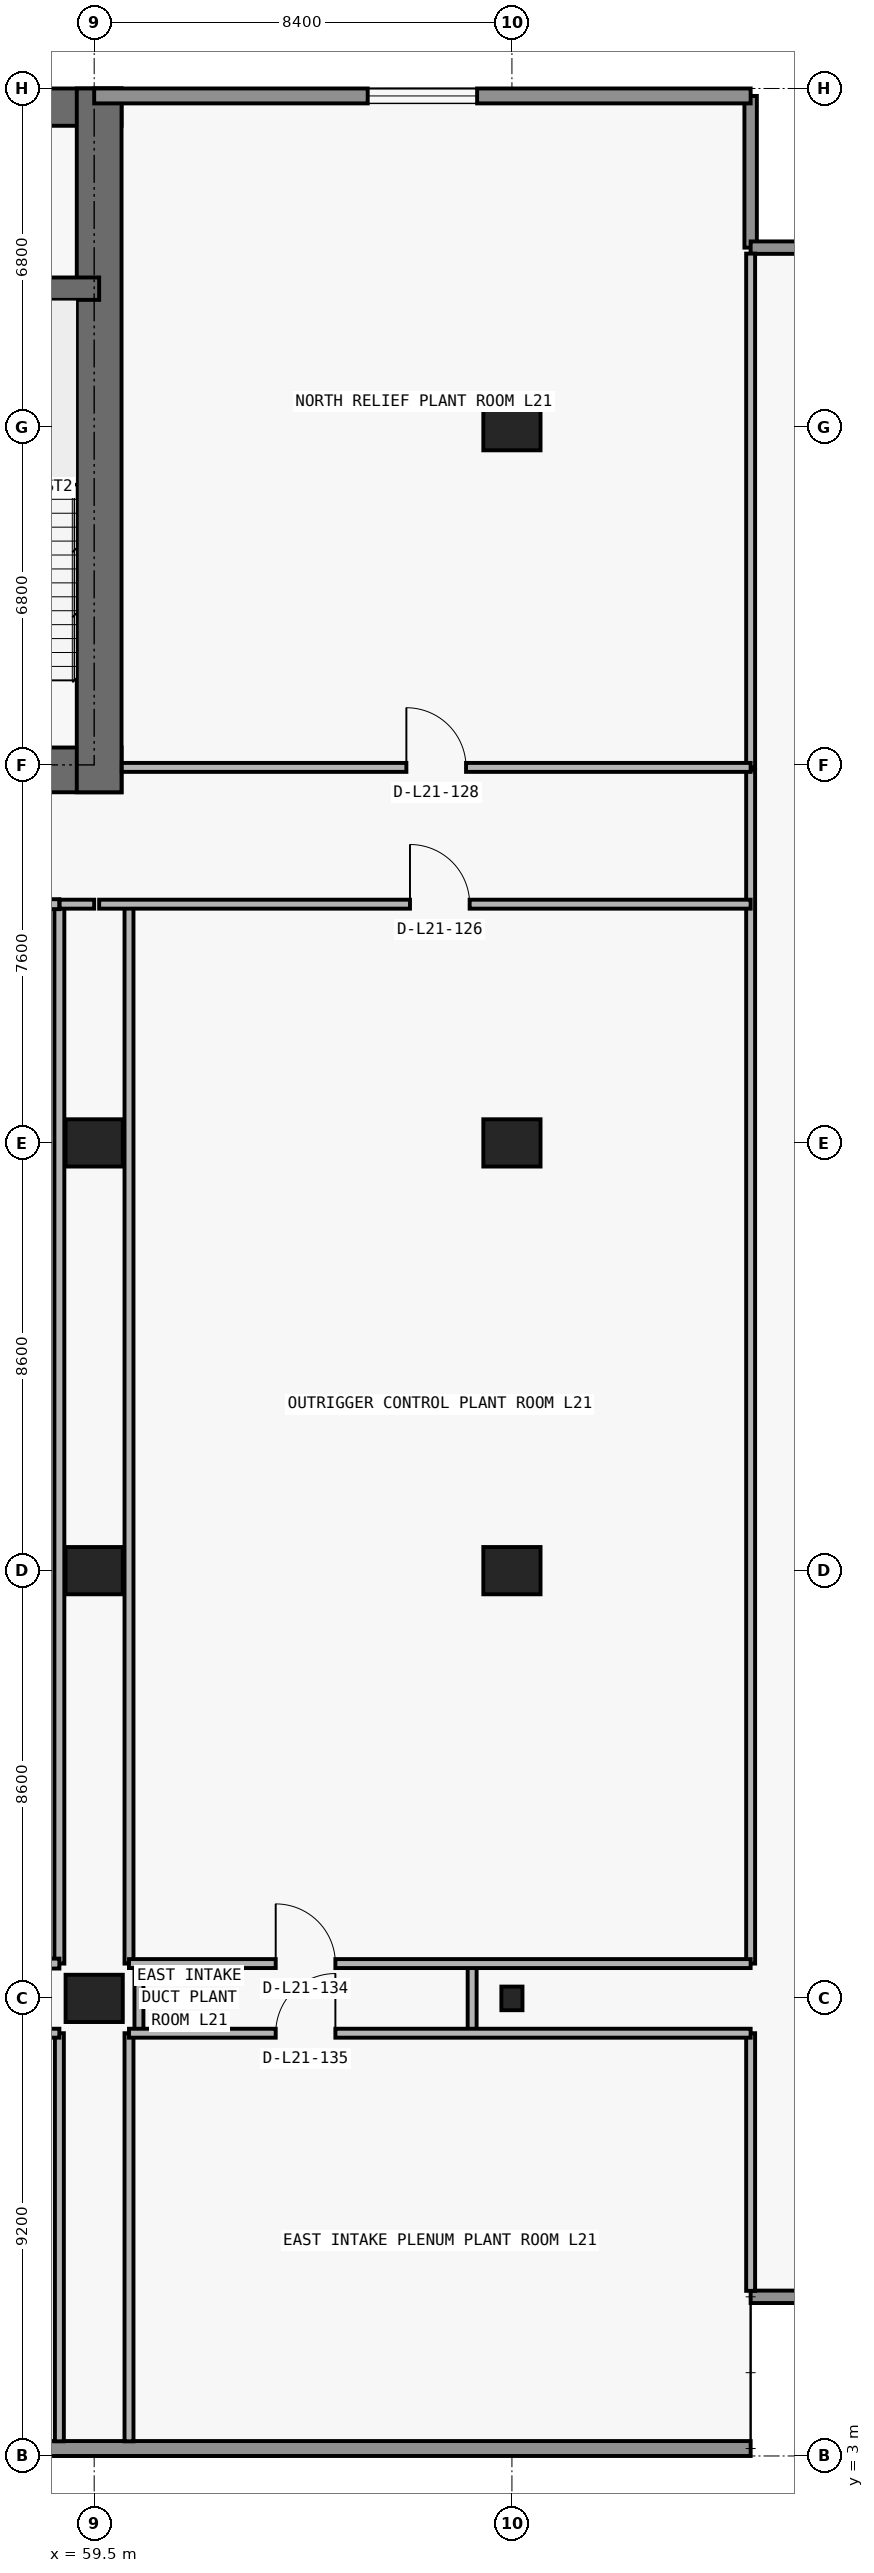
"""IFC4 building model, lengths in metres.
Left out: names, types, materials, properties, quantities, classifications, styles, units other than length and angle.
Written with IfcOpenShell. Run it as: python <this file> out.ifc"""

import sys

from ifc_helpers import new_model, si_unit, direction, frame, frame_2d, origin, origin_2d, place, context, subcontext, project, spatial, rectangle, i_section, extrude, element, fill, save


model = new_model("IFC4")
c1 = context("Model", 3, precision=1e-05, world=origin(), true_north=direction((0.0, 1.0)))
c2 = subcontext(c1, "Body", "Model", "MODEL_VIEW")
j1 = project(units=[si_unit("LENGTHUNIT", "METRE"), si_unit("PLANEANGLEUNIT", "RADIAN")], contexts=[c1])
p1 = place(None, origin())
s1 = spatial("IfcSite", under=j1, at=p1, CompositionType="ELEMENT")
p2 = place(p1, origin())
s2 = spatial("IfcBuilding", under=s1, at=p2, CompositionType="ELEMENT")
p3 = place(p2, frame((0.0, 0.0, 79.5)))
s3 = spatial("IfcBuildingStorey", under=s2, at=p3, CompositionType="ELEMENT", Elevation=79.5)
p4 = place(p3, frame((59.5, 12.2, 0.0), z_axis=(0.0, 0.0, 1.0), x_axis=(1.0, 0.0, 0.0)))
e1 = element("IfcColumn", 1, at=p4, inside=s3, PredefinedType="COLUMN", context=c2, shape_type="SweptSolid", body=[
    extrude(rectangle(XDim=1.15, YDim=0.95, at=origin_2d()), origin(), (0.0, 0.0, 1.0), 4.85),
])
p5 = place(p3, frame((67.9, 12.2, 0.0), z_axis=(0.0, 0.0, 1.0), x_axis=(1.0, 0.0, 0.0)))
e2 = element("IfcColumn", 2, at=p5, inside=s3, PredefinedType="COLUMN", context=c2, shape_type="SweptSolid", body=[
    extrude(i_section(OverallWidth=0.424, OverallDepth=0.475, WebThickness=0.048, FlangeThickness=0.077, FilletRadius=0.015, at=origin_2d()), origin(), (0.0, 0.0, 1.0), 4.85),
])
for number, where, z_axis, x_axis in (
    (3, (59.5, 20.8, 0.0), (0.0, 0.0, 1.0), (1.0, 0.0, 0.0)),
    (4, (67.9, 20.8, 0.0), (0.0, 0.0, 1.0), (1.0, 0.0, 0.0)),
    (5, (59.5, 29.4, 0.0), (0.0, 0.0, 1.0), (1.0, 0.0, 0.0)),
    (6, (67.9, 29.4, 0.0), (0.0, 0.0, 1.0), (1.0, 0.0, 0.0)),
    (7, (67.9, 43.8, 0.0), (0.0, 0.0, 1.0), (1.0, 0.0, 0.0)),
):
    element("IfcColumn", number, at=place(p3, frame(where, z_axis=z_axis, x_axis=x_axis)), inside=s3, PredefinedType="COLUMN", context=c2, shape_type="SweptSolid", body=[
        extrude(rectangle(XDim=1.15, YDim=0.95, at=origin_2d()), origin(), (0.0, 0.0, 1.0), 4.85),
    ])
p6 = place(p3, frame((17.75, 36.9, 0.0), z_axis=(0.0, 0.0, 1.0), x_axis=(1.0, 0.0, 0.0)))
e8 = element("IfcWall", 8, at=p6, inside=s3, PredefinedType="SHEAR", context=c2, shape_type="SweptSolid", body=[
    extrude(rectangle(XDim=42.3, YDim=0.9, at=frame_2d((21.15, 0.0))), origin(), (0.0, 0.0, 1.0), 4.85),
])
p7 = place(p6, frame((14.55, 0.0, 0.0)))
e9 = element("IfcOpeningElement", 9, at=p7, cuts=e8, PredefinedType="OPENING", context=c2, shape_type="SweptSolid", body=[
    extrude(rectangle(XDim=1.1, YDim=2.15, at=frame_2d((0.55, 1.075))), frame((0.0, 0.46, 0.0), z_axis=(0.0, -1.0, 0.0), x_axis=(1.0, 0.0, 0.0)), (0.0, 0.0, 1.0), 0.92),
])
p8 = place(p6, frame((6.4, 0.0, 0.0)))
e10 = element("IfcOpeningElement", 10, at=p8, cuts=e8, PredefinedType="OPENING", context=c2, shape_type="SweptSolid", body=[
    extrude(rectangle(XDim=1.05, YDim=2.15, at=frame_2d((0.525, 1.075))), frame((0.0, 0.46, 0.0), z_axis=(0.0, -1.0, 0.0), x_axis=(1.0, 0.0, 0.0)), (0.0, 0.0, 1.0), 0.92),
])
p9 = place(p6, frame((34.9, 0.0, 0.0)))
e11 = element("IfcOpeningElement", 11, at=p9, cuts=e8, PredefinedType="OPENING", context=c2, shape_type="SweptSolid", body=[
    extrude(rectangle(XDim=1.05, YDim=2.15, at=frame_2d((0.525, 1.075))), frame((0.0, 0.46, 0.0), z_axis=(0.0, -1.0, 0.0), x_axis=(1.0, 0.0, 0.0)), (0.0, 0.0, 1.0), 0.92),
])
p10 = place(p6, frame((11.012, 0.0, 0.0)))
e12 = element("IfcOpeningElement", 12, at=p10, cuts=e8, PredefinedType="OPENING", context=c2, shape_type="SweptSolid", body=[
    extrude(rectangle(XDim=1.05, YDim=2.15, at=frame_2d((0.525, 1.075))), frame((0.0, 0.46, 0.0), z_axis=(0.0, -1.0, 0.0), x_axis=(1.0, 0.0, 0.0)), (0.0, 0.0, 1.0), 0.92),
])
p11 = place(p6, frame((24.25, 0.0, 0.0)))
e13 = element("IfcOpeningElement", 13, at=p11, cuts=e8, PredefinedType="OPENING", context=c2, shape_type="SweptSolid", body=[
    extrude(rectangle(XDim=1.05, YDim=2.15, at=frame_2d((0.525, 1.075))), frame((0.0, 0.46, 0.0), z_axis=(0.0, -1.0, 0.0), x_axis=(1.0, 0.0, 0.0)), (0.0, 0.0, 1.0), 0.92),
])
p12 = place(p3, frame((17.75, 50.225, 0.0), z_axis=(0.0, 0.0, 1.0), x_axis=(1.0, 0.0, 0.0)))
e14 = element("IfcWall", 14, at=p12, inside=s3, PredefinedType="SHEAR", context=c2, shape_type="SweptSolid", body=[
    extrude(rectangle(XDim=42.3, YDim=0.75, at=frame_2d((21.15, 0.0))), origin(), (0.0, 0.0, 1.0), 4.85),
])
p13 = place(p3, frame((59.6, 36.45, 0.0), z_axis=(0.0, 0.0, 1.0), x_axis=(0.0, 1.0, 0.0)))
e15 = element("IfcWall", 15, at=p13, inside=s3, PredefinedType="SHEAR", context=c2, shape_type="SweptSolid", body=[
    extrude(rectangle(XDim=14.15, YDim=0.9, at=frame_2d((7.075, 0.0))), origin(), (0.0, 0.0, 1.0), 4.85),
])
p14 = place(p3, frame((18.2, 46.575, 0.0), z_axis=(0.0, 0.0, 1.0), x_axis=(1.0, 0.0, 0.0)))
e16 = element("IfcWall", 16, at=p14, inside=s3, PredefinedType="SHEAR", context=c2, shape_type="SweptSolid", body=[
    extrude(rectangle(XDim=41.4, YDim=0.45, at=frame_2d((20.7, 0.0))), origin(), (0.0, 0.0, 1.0), 4.85),
])
p15 = place(p14, frame((7.7, 0.0, 0.0)))
e17 = element("IfcOpeningElement", 17, at=p15, cuts=e16, PredefinedType="OPENING", context=c2, shape_type="SweptSolid", body=[
    extrude(rectangle(XDim=1.0, YDim=2.2, at=frame_2d((0.5, 1.1))), frame((0.0, 0.235, 0.0), z_axis=(0.0, -1.0, 0.0), x_axis=(1.0, 0.0, 0.0)), (0.0, 0.0, 1.0), 0.47),
])
p16 = place(p14, frame((32.725, 0.0, 0.0)))
e18 = element("IfcOpeningElement", 18, at=p16, cuts=e16, PredefinedType="OPENING", context=c2, shape_type="SweptSolid", body=[
    extrude(rectangle(XDim=1.05, YDim=2.15, at=frame_2d((0.525, 1.075))), frame((0.0, 0.235, 0.0), z_axis=(0.0, -1.0, 0.0), x_axis=(1.0, 0.0, 0.0)), (0.0, 0.0, 1.0), 0.47),
])
p17 = place(p3, frame((72.7, 3.15, 0.0), z_axis=(0.0, 0.0, 1.0), x_axis=(-1.0, 0.0, 0.0)))
e19 = element("IfcWall", 19, at=p17, inside=s3, PredefinedType="STANDARD", context=c2, shape_type="SweptSolid", body=[
    extrude(rectangle(XDim=67.6, YDim=0.3, at=frame_2d((33.8, 0.0))), origin(), (0.0, 0.0, 1.0), 4.85),
])
p18 = place(p3, frame((72.7, 6.2, 0.0), z_axis=(0.0, 0.0, 1.0), x_axis=(1.0, 0.0, 0.0)))
e20 = element("IfcWall", 20, at=p18, inside=s3, PredefinedType="ELEMENTEDWALL", context=c2, shape_type="SweptSolid", body=[
    extrude(rectangle(XDim=3.45, YDim=0.25, at=frame_2d((1.725, 0.0))), origin(), (0.0, 0.0, 1.0), 4.85),
])
p19 = place(p3, frame((72.7, 50.45, 0.0), z_axis=(0.0, 0.0, 1.0), x_axis=(0.0, -1.0, 0.0)))
e21 = element("IfcWall", 21, at=p19, inside=s3, PredefinedType="ELEMENTEDWALL", context=c2, shape_type="SweptSolid", body=[
    extrude(rectangle(XDim=3.05, YDim=0.25, at=frame_2d((1.525, 0.0))), origin(), (0.0, 0.0, 1.0), 4.85),
])
p20 = place(p3, frame((72.7, 47.4, 0.0), z_axis=(0.0, 0.0, 1.0), x_axis=(1.0, 0.0, 0.0)))
e22 = element("IfcWall", 22, at=p20, inside=s3, PredefinedType="ELEMENTEDWALL", context=c2, shape_type="SweptSolid", body=[
    extrude(rectangle(XDim=3.45, YDim=0.25, at=frame_2d((1.725, 0.0))), origin(), (0.0, 0.0, 1.0), 4.85),
])
p21 = place(p3, frame((59.5, 50.45, 0.0), z_axis=(0.0, 0.0, 1.0), x_axis=(1.0, 0.0, 0.0)))
e23 = element("IfcWall", 23, at=p21, inside=s3, PredefinedType="STANDARD", context=c2, shape_type="SweptSolid", body=[
    extrude(rectangle(XDim=13.2, YDim=0.3, at=frame_2d((6.6, 0.0))), origin(), (0.0, 0.0, 1.0), 4.85),
])
p22 = place(p21, frame((5.5, 0.0, 0.85)))
e24 = element("IfcOpeningElement", 24, at=p22, cuts=e23, PredefinedType="OPENING", context=c2, shape_type="SweptSolid", body=[
    extrude(rectangle(XDim=2.2, YDim=1.55, at=frame_2d((1.1, 0.775))), frame((0.0, 0.16, 0.0), z_axis=(0.0, -1.0, 0.0), x_axis=(1.0, 0.0, 0.0)), (0.0, 0.0, 1.0), 0.32),
])
p23 = place(p3, frame((58.8, 3.295, 0.0), z_axis=(0.0, 0.0, 1.0), x_axis=(0.0, 1.0, 0.0)))
e25 = element("IfcWall", 25, at=p23, inside=s3, PredefinedType="PARTITIONING", context=c2, shape_type="SweptSolid", body=[
    extrude(rectangle(XDim=8.205, YDim=0.18, at=frame_2d((4.103, 0.0))), origin(), (0.0, 0.0, 1.0), 4.85),
])
p24 = place(p3, frame((58.8, 12.9, 0.0), z_axis=(0.0, 0.0, 1.0), x_axis=(0.0, 1.0, 0.0)))
e26 = element("IfcWall", 26, at=p24, inside=s3, PredefinedType="PARTITIONING", context=c2, shape_type="SweptSolid", body=[
    extrude(rectangle(XDim=21.3, YDim=0.2, at=frame_2d((10.65, 0.0))), origin(), (0.0, 0.0, 1.0), 4.85),
])
p25 = place(p3, frame((60.2, 3.295, 0.0), z_axis=(0.0, 0.0, 1.0), x_axis=(0.0, 1.0, 0.0)))
e27 = element("IfcWall", 27, at=p25, inside=s3, PredefinedType="PARTITIONING", context=c2, shape_type="SweptSolid", body=[
    extrude(rectangle(XDim=8.205, YDim=0.18, at=frame_2d((4.103, 0.0))), origin(), (0.0, 0.0, 1.0), 4.85),
])
p26 = place(p3, frame((60.2, 12.9, 0.0), z_axis=(0.0, 0.0, 1.0), x_axis=(0.0, 1.0, 0.0)))
e28 = element("IfcWall", 28, at=p26, inside=s3, PredefinedType="PARTITIONING", context=c2, shape_type="SweptSolid", body=[
    extrude(rectangle(XDim=21.3, YDim=0.18, at=frame_2d((10.65, 0.0))), origin(), (0.0, 0.0, 1.0), 4.85),
])
p27 = place(p3, frame((60.4, 11.505, 0.0), z_axis=(0.0, 0.0, 1.0), x_axis=(0.0, 1.0, 0.0)))
e29 = element("IfcWall", 29, at=p27, inside=s3, PredefinedType="PARTITIONING", context=c2, shape_type="SweptSolid", body=[
    extrude(rectangle(XDim=1.39, YDim=0.18, at=frame_2d((0.695, 0.0))), origin(), (0.0, 0.0, 1.0), 4.85),
])
p28 = place(p3, frame((67.1, 11.5, 0.0), z_axis=(0.0, 0.0, 1.0), x_axis=(0.0, 1.0, 0.0)))
e30 = element("IfcWall", 30, at=p28, inside=s3, PredefinedType="PARTITIONING", context=c2, shape_type="SweptSolid", body=[
    extrude(rectangle(XDim=1.4, YDim=0.18, at=frame_2d((0.7, 0.0))), origin(), (0.0, 0.0, 1.0), 4.85),
])
p29 = place(p3, frame((72.7, 6.32, 0.0), z_axis=(0.0, 0.0, 1.0), x_axis=(0.0, 1.0, 0.0)))
e31 = element("IfcWall", 31, at=p29, inside=s3, PredefinedType="PARTITIONING", context=c2, shape_type="SweptSolid", body=[
    extrude(rectangle(XDim=5.18, YDim=0.18, at=frame_2d((2.59, 0.0))), origin(), (0.0, 0.0, 1.0), 4.85),
])
p30 = place(p3, frame((72.7, 12.9, 0.0), z_axis=(0.0, 0.0, 1.0), x_axis=(0.0, 1.0, 0.0)))
e32 = element("IfcWall", 32, at=p30, inside=s3, PredefinedType="PARTITIONING", context=c2, shape_type="SweptSolid", body=[
    extrude(rectangle(XDim=24.0, YDim=0.18, at=frame_2d((12.0, 0.0))), origin(), (0.0, 0.0, 1.0), 4.85),
])
p31 = place(p3, frame((72.7, 36.95, 0.0), z_axis=(0.0, 0.0, 1.0), x_axis=(0.0, 1.0, 0.0)))
e33 = element("IfcWall", 33, at=p31, inside=s3, PredefinedType="PARTITIONING", context=c2, shape_type="SweptSolid", body=[
    extrude(rectangle(XDim=10.33, YDim=0.18, at=frame_2d((5.165, 0.0))), origin(), (0.0, 0.0, 1.0), 4.85),
])
p32 = place(p3, frame((19.0, 11.5, 0.0), z_axis=(0.0, 0.0, 1.0), x_axis=(1.0, 0.0, 0.0)))
e34 = element("IfcWall", 34, at=p32, inside=s3, PredefinedType="PARTITIONING", context=c2, shape_type="SweptSolid", body=[
    extrude(rectangle(XDim=39.8, YDim=0.18, at=frame_2d((19.9, 0.0))), origin(), (0.0, 0.0, 1.0), 4.85),
])
p33 = place(p32, frame((19.3, 0.0, 0.0)))
e35 = element("IfcOpeningElement", 35, at=p33, cuts=e34, PredefinedType="OPENING", context=c2, shape_type="SweptSolid", body=[
    extrude(rectangle(XDim=1.2, YDim=2.2, at=frame_2d((0.6, 1.1))), frame((0.0, 0.1, 0.0), z_axis=(0.0, -1.0, 0.0), x_axis=(1.0, 0.0, 0.0)), (0.0, 0.0, 1.0), 0.2),
])
p34 = place(p3, frame((60.2, 11.5, 0.0), z_axis=(0.0, 0.0, 1.0), x_axis=(1.0, 0.0, 0.0)))
e36 = element("IfcWall", 36, at=p34, inside=s3, PredefinedType="PARTITIONING", context=c2, shape_type="SweptSolid", body=[
    extrude(rectangle(XDim=12.5, YDim=0.18, at=frame_2d((6.25, 0.0))), origin(), (0.0, 0.0, 1.0), 4.85),
])
p35 = place(p34, frame((2.95, 0.0, 0.0)))
e37 = element("IfcOpeningElement", 37, at=p35, cuts=e36, PredefinedType="OPENING", context=c2, shape_type="SweptSolid", body=[
    extrude(rectangle(XDim=1.2, YDim=2.2, at=frame_2d((0.6, 1.1))), frame((0.0, 0.1, 0.0), z_axis=(0.0, -1.0, 0.0), x_axis=(1.0, 0.0, 0.0)), (0.0, 0.0, 1.0), 0.2),
])
p36 = place(p3, frame((42.705, 12.9, 0.0), z_axis=(0.0, 0.0, 1.0), x_axis=(1.0, 0.0, 0.0)))
e38 = element("IfcWall", 38, at=p36, inside=s3, PredefinedType="PARTITIONING", context=c2, shape_type="SweptSolid", body=[
    extrude(rectangle(XDim=16.095, YDim=0.2, at=frame_2d((8.047, 0.0))), origin(), (0.0, 0.0, 1.0), 4.85),
])
p37 = place(p3, frame((60.2, 12.9, 0.0), z_axis=(0.0, 0.0, 1.0), x_axis=(1.0, 0.0, 0.0)))
e39 = element("IfcWall", 39, at=p37, inside=s3, PredefinedType="PARTITIONING", context=c2, shape_type="SweptSolid", body=[
    extrude(rectangle(XDim=12.5, YDim=0.18, at=frame_2d((6.25, 0.0))), origin(), (0.0, 0.0, 1.0), 4.85),
])
p38 = place(p37, frame((2.95, 0.0, 0.0)))
e40 = element("IfcOpeningElement", 40, at=p38, cuts=e39, PredefinedType="OPENING", context=c2, shape_type="SweptSolid", body=[
    extrude(rectangle(XDim=1.2, YDim=2.2, at=frame_2d((0.6, 1.1))), frame((0.0, 0.1, 0.0), z_axis=(0.0, -1.0, 0.0), x_axis=(1.0, 0.0, 0.0)), (0.0, 0.0, 1.0), 0.2),
])
p39 = place(p3, frame((42.705, 34.2, 0.0), z_axis=(0.0, 0.0, 1.0), x_axis=(1.0, 0.0, 0.0)))
e41 = element("IfcWall", 41, at=p39, inside=s3, PredefinedType="PARTITIONING", context=c2, shape_type="SweptSolid", body=[
    extrude(rectangle(XDim=16.095, YDim=0.2, at=frame_2d((8.047, 0.0))), origin(), (0.0, 0.0, 1.0), 4.85),
])
p40 = place(p39, frame((7.522, 0.0, 0.0)))
e42 = element("IfcOpeningElement", 42, at=p40, cuts=e41, PredefinedType="OPENING", context=c2, shape_type="SweptSolid", body=[
    extrude(rectangle(XDim=1.05, YDim=2.15, at=frame_2d((0.525, 1.075))), frame((0.0, 0.11, 0.0), z_axis=(0.0, -1.0, 0.0), x_axis=(1.0, 0.0, 0.0)), (0.0, 0.0, 1.0), 0.22),
])
p41 = place(p3, frame((58.805, 34.2, 0.0), z_axis=(0.0, 0.0, 1.0), x_axis=(1.0, 0.0, 0.0)))
e43 = element("IfcWall", 43, at=p41, inside=s3, PredefinedType="PARTITIONING", context=c2, shape_type="SweptSolid", body=[
    extrude(rectangle(XDim=0.695, YDim=0.18, at=frame_2d((0.348, 0.0))), origin(), (0.0, 0.0, 1.0), 4.85),
])
p42 = place(p3, frame((59.6, 34.2, 0.0), z_axis=(0.0, 0.0, 1.0), x_axis=(1.0, 0.0, 0.0)))
e44 = element("IfcWall", 44, at=p42, inside=s3, PredefinedType="PARTITIONING", context=c2, shape_type="SweptSolid", body=[
    extrude(rectangle(XDim=13.1, YDim=0.18, at=frame_2d((6.55, 0.0))), origin(), (0.0, 0.0, 1.0), 4.85),
])
p43 = place(p42, frame((6.25, 0.0, 0.0)))
e45 = element("IfcOpeningElement", 45, at=p43, cuts=e44, PredefinedType="OPENING", context=c2, shape_type="SweptSolid", body=[
    extrude(rectangle(XDim=1.2, YDim=2.2, at=frame_2d((0.6, 1.1))), frame((0.0, 0.1, 0.0), z_axis=(0.0, -1.0, 0.0), x_axis=(1.0, 0.0, 0.0)), (0.0, 0.0, 1.0), 0.2),
])
p44 = place(p3, frame((60.055, 36.95, 0.0), z_axis=(0.0, 0.0, 1.0), x_axis=(1.0, 0.0, 0.0)))
e46 = element("IfcWall", 46, at=p44, inside=s3, PredefinedType="PARTITIONING", context=c2, shape_type="SweptSolid", body=[
    extrude(rectangle(XDim=12.645, YDim=0.18, at=frame_2d((6.323, 0.0))), origin(), (0.0, 0.0, 1.0), 4.85),
])
p45 = place(p44, frame((5.722, 0.0, 0.0)))
e47 = element("IfcOpeningElement", 47, at=p45, cuts=e46, PredefinedType="OPENING", context=c2, shape_type="SweptSolid", body=[
    extrude(rectangle(XDim=1.2, YDim=2.2, at=frame_2d((0.6, 1.1))), frame((0.0, 0.1, 0.0), z_axis=(0.0, -1.0, 0.0), x_axis=(1.0, 0.0, 0.0)), (0.0, 0.0, 1.0), 0.2),
])
p46 = place(p22, origin())
e48 = element("IfcWindow", 48, at=p46, inside=s3, PartitioningType="SINGLE_PANEL", PredefinedType="WINDOW", context=c2, shape_type="SweptSolid", body=[
    extrude(rectangle(XDim=2.2, YDim=1.55, at=frame_2d((1.1, 0.775))), frame((0.0, 0.03, 0.0), z_axis=(0.0, -1.0, 0.0), x_axis=(1.0, 0.0, 0.0)), (0.0, 0.0, 1.0), 0.06),
])
fill(e24, e48)
p47 = place(p43, origin())
e49 = element("IfcDoor", 49, at=p47, inside=s3, OperationType="SINGLE_SWING_LEFT", PredefinedType="DOOR", context=c2, shape_type="SweptSolid", body=[
    extrude(rectangle(XDim=1.2, YDim=2.2, at=frame_2d((0.6, 1.1))), frame((0.0, 0.025, 0.0), z_axis=(0.0, -1.0, 0.0), x_axis=(1.0, 0.0, 0.0)), (0.0, 0.0, 1.0), 0.05),
])
fill(e45, e49)
p48 = place(p45, origin())
e50 = element("IfcDoor", 50, at=p48, inside=s3, OperationType="SINGLE_SWING_LEFT", PredefinedType="DOOR", context=c2, shape_type="SweptSolid", body=[
    extrude(rectangle(XDim=1.2, YDim=2.2, at=frame_2d((0.6, 1.1))), frame((0.0, 0.025, 0.0), z_axis=(0.0, -1.0, 0.0), x_axis=(1.0, 0.0, 0.0)), (0.0, 0.0, 1.0), 0.05),
])
fill(e47, e50)
p49 = place(p38, origin())
e51 = element("IfcDoor", 51, at=p49, inside=s3, OperationType="SINGLE_SWING_LEFT", PredefinedType="DOOR", context=c2, shape_type="SweptSolid", body=[
    extrude(rectangle(XDim=1.2, YDim=2.2, at=frame_2d((0.6, 1.1))), frame((0.0, 0.025, 0.0), z_axis=(0.0, -1.0, 0.0), x_axis=(1.0, 0.0, 0.0)), (0.0, 0.0, 1.0), 0.05),
])
fill(e40, e51)
p50 = place(p35, origin())
e52 = element("IfcDoor", 52, at=p50, inside=s3, OperationType="SINGLE_SWING_RIGHT", PredefinedType="DOOR", context=c2, shape_type="SweptSolid", body=[
    extrude(rectangle(XDim=1.2, YDim=2.2, at=frame_2d((0.6, 1.1))), frame((0.0, 0.025, 0.0), z_axis=(0.0, -1.0, 0.0), x_axis=(1.0, 0.0, 0.0)), (0.0, 0.0, 1.0), 0.05),
])
fill(e37, e52)
save(model, sys.argv[1])
